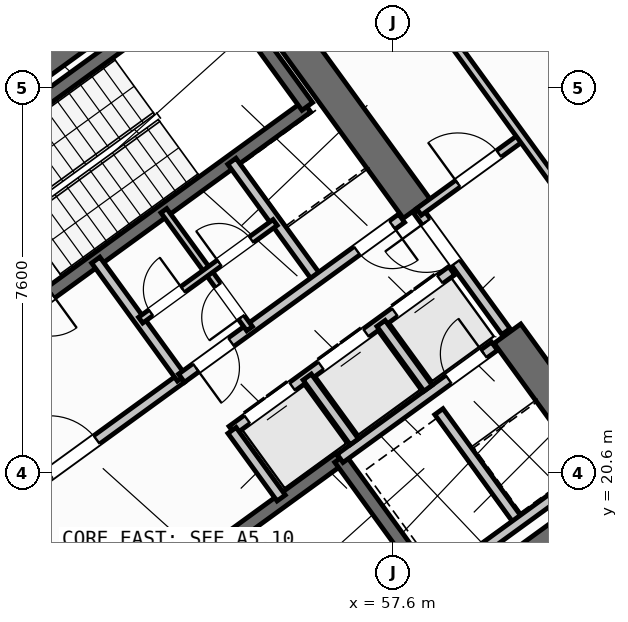
"""IFC4 building model, lengths in metres.
Left out: names, types, materials, properties, quantities, classifications, styles, units other than length and angle.
Written with IfcOpenShell. Run it as: python <this file> out.ifc"""

import sys

from ifc_helpers import new_model, si_unit, direction, frame, frame_2d, origin, place, context, subcontext, project, spatial, rectangle, extrude, source, transform, mapped, element, fill, save


model = new_model("IFC4")
c1 = context("Model", 3, precision=1e-05, world=origin(), true_north=direction((0.0, 1.0)))
c2 = subcontext(c1, "Body", "Model", "MODEL_VIEW")
j1 = project(units=[si_unit("LENGTHUNIT", "METRE"), si_unit("PLANEANGLEUNIT", "RADIAN")], contexts=[c1])
p1 = place(None, origin())
s1 = spatial("IfcSite", under=j1, at=p1, CompositionType="ELEMENT")
p2 = place(p1, origin())
s2 = spatial("IfcBuilding", under=s1, at=p2, CompositionType="ELEMENT")
p3 = place(p2, frame((0.0, 0.0, 67.2)))
s3 = spatial("IfcBuildingStorey", under=s2, at=p3, CompositionType="ELEMENT", Elevation=67.2)
p4 = place(p3, frame((52.318, 13.11, 0.0), z_axis=(0.0, 0.0, 1.0), x_axis=(0.809019445368, 0.587781878776, 0.0)))
e1 = element("IfcWall", 1, at=p4, inside=s3, PredefinedType="SHEAR", context=c2, shape_type="SweptSolid", body=[
    extrude(rectangle(XDim=12.44, YDim=0.65, at=frame_2d((6.22, 0.0))), origin(), (0.0, 0.0, 1.0), 4.22),
])
p5 = place(p3, frame((44.325, 24.113, 0.0), z_axis=(0.0, 0.0, 1.0), x_axis=(0.809012664862, 0.58779121131, 0.0)))
e2 = element("IfcWall", 2, at=p5, inside=s3, PredefinedType="SHEAR", context=c2, shape_type="SweptSolid", body=[
    extrude(rectangle(XDim=12.44, YDim=0.65, at=frame_2d((6.22, 0.0))), origin(), (0.0, 0.0, 1.0), 4.22),
])
p6 = place(p3, frame((61.929, 20.494, 0.0), z_axis=(0.0, 0.0, 1.0), x_axis=(-0.58782982593, 0.808984607855, 0.0)))
e3 = element("IfcWall", 3, at=p6, inside=s3, PredefinedType="SHEAR", context=c2, shape_type="SweptSolid", body=[
    extrude(rectangle(XDim=3.525, YDim=0.65, at=frame_2d((1.762, 0.0))), origin(), (0.0, 0.0, 1.0), 4.22),
])
p7 = place(p3, frame((58.064, 25.813, 0.0), z_axis=(0.0, 0.0, 1.0), x_axis=(-0.58777996584, 0.809020835181, 0.0)))
e4 = element("IfcWall", 4, at=p7, inside=s3, PredefinedType="SHEAR", context=c2, shape_type="SweptSolid", body=[
    extrude(rectangle(XDim=6.375, YDim=0.65, at=frame_2d((3.188, 0.0))), origin(), (0.0, 0.0, 1.0), 4.22),
])
p8 = place(p3, frame((43.938, 25.192, 0.0), z_axis=(0.0, 0.0, 1.0), x_axis=(0.809016324578, 0.587786174187, 0.0)))
e5 = element("IfcWall", 5, at=p8, inside=s3, PredefinedType="STANDARD", context=c2, shape_type="SweptSolid", body=[
    extrude(rectangle(XDim=17.587, YDim=0.32, at=frame_2d((8.794, 0.0))), origin(), (0.0, 0.0, 1.0), 4.22),
])
p9 = place(p8, frame((14.926, 0.0, 0.0)))
e6 = element("IfcOpeningElement", 6, at=p9, cuts=e5, PredefinedType="OPENING", context=c2, shape_type="SweptSolid", body=[
    extrude(rectangle(XDim=1.05, YDim=2.15, at=frame_2d((0.525, 1.075))), frame((0.0, 0.17, 0.0), z_axis=(0.0, -1.0, 0.0), x_axis=(1.0, 0.0, 0.0)), (0.0, 0.0, 1.0), 0.34),
])
p10 = place(p8, frame((2.606, 0.0, 0.8)))
e7 = element("IfcOpeningElement", 7, at=p10, cuts=e5, PredefinedType="OPENING", context=c2, shape_type="SweptSolid", body=[
    extrude(rectangle(XDim=2.1, YDim=1.55, at=frame_2d((1.05, 0.775))), frame((0.0, 0.17, 0.0), z_axis=(0.0, -1.0, 0.0), x_axis=(1.0, 0.0, 0.0)), (0.0, 0.0, 1.0), 0.34),
])
p11 = place(p8, frame((6.881, 0.0, 0.8)))
e8 = element("IfcOpeningElement", 8, at=p11, cuts=e5, PredefinedType="OPENING", context=c2, shape_type="SweptSolid", body=[
    extrude(rectangle(XDim=2.1, YDim=1.55, at=frame_2d((1.05, 0.775))), frame((0.0, 0.17, 0.0), z_axis=(0.0, -1.0, 0.0), x_axis=(1.0, 0.0, 0.0)), (0.0, 0.0, 1.0), 0.34),
])
p12 = place(p3, frame((58.455, 35.484, 0.0), z_axis=(0.0, 0.0, 1.0), x_axis=(0.587783625747, -0.809018176127, 0.0)))
e9 = element("IfcWall", 9, at=p12, inside=s3, PredefinedType="STANDARD", context=c2, shape_type="SweptSolid", body=[
    extrude(rectangle(XDim=21.587, YDim=0.32, at=frame_2d((10.794, 0.0))), origin(), (0.0, 0.0, 1.0), 2.395),
])
p13 = place(p12, frame((2.194, 0.0, 1.0)))
e10 = element("IfcOpeningElement", 10, at=p13, cuts=e9, PredefinedType="OPENING", context=c2, shape_type="SweptSolid", body=[
    extrude(rectangle(XDim=0.9, YDim=1.25, at=frame_2d((0.45, 0.625))), frame((0.0, 0.17, 0.0), z_axis=(0.0, -1.0, 0.0), x_axis=(1.0, 0.0, 0.0)), (0.0, 0.0, 1.0), 0.34),
])
p14 = place(p12, frame((4.994, 0.0, 1.0)))
e11 = element("IfcOpeningElement", 11, at=p14, cuts=e9, PredefinedType="OPENING", context=c2, shape_type="SweptSolid", body=[
    extrude(rectangle(XDim=0.9, YDim=1.25, at=frame_2d((0.45, 0.625))), frame((0.0, 0.17, 0.0), z_axis=(0.0, -1.0, 0.0), x_axis=(1.0, 0.0, 0.0)), (0.0, 0.0, 1.0), 0.34),
])
p15 = place(p12, frame((12.384, 0.0, 1.0)))
e12 = element("IfcOpeningElement", 12, at=p15, cuts=e9, PredefinedType="OPENING", context=c2, shape_type="SweptSolid", body=[
    extrude(rectangle(XDim=0.9, YDim=1.25, at=frame_2d((0.45, 0.625))), frame((0.0, 0.17, 0.0), z_axis=(0.0, -1.0, 0.0), x_axis=(1.0, 0.0, 0.0)), (0.0, 0.0, 1.0), 0.34),
])
p16 = place(p12, frame((18.835, 0.0, 1.0)))
e13 = element("IfcOpeningElement", 13, at=p16, cuts=e9, PredefinedType="OPENING", context=c2, shape_type="SweptSolid", body=[
    extrude(rectangle(XDim=0.9, YDim=1.25, at=frame_2d((0.45, 0.625))), frame((0.0, 0.17, 0.0), z_axis=(0.0, -1.0, 0.0), x_axis=(1.0, 0.0, 0.0)), (0.0, 0.0, 1.0), 0.34),
])
p17 = place(p3, frame((48.006, 25.996, 0.0), z_axis=(0.0, 0.0, 1.0), x_axis=(0.80901903764, 0.587782439969, 0.0)))
e14 = element("IfcWall", 14, at=p17, inside=s3, PredefinedType="SHEAR", context=c2, shape_type="SweptSolid", body=[
    extrude(rectangle(XDim=7.46, YDim=0.26, at=frame_2d((3.73, 0.0))), origin(), (0.0, 0.0, 1.0), 4.22),
])
p18 = place(p3, frame((49.863, 23.44, 0.0), z_axis=(0.0, 0.0, 1.0), x_axis=(0.809003474932, 0.587803859759, 0.0)))
e15 = element("IfcWall", 15, at=p18, inside=s3, PredefinedType="SHEAR", context=c2, shape_type="SweptSolid", body=[
    extrude(rectangle(XDim=7.46, YDim=0.26, at=frame_2d((3.73, 0.0))), origin(), (0.0, 0.0, 1.0), 4.22),
])
p19 = place(p18, frame((0.36, 0.0, 0.0)))
e16 = element("IfcOpeningElement", 16, at=p19, cuts=e15, PredefinedType="OPENING", context=c2, shape_type="SweptSolid", body=[
    extrude(rectangle(XDim=0.86, YDim=2.05, at=frame_2d((0.43, 1.025))), frame((0.0, 0.14, 0.0), z_axis=(0.0, -1.0, 0.0), x_axis=(1.0, 0.0, 0.0)), (0.0, 0.0, 1.0), 0.28),
])
p20 = place(p3, frame((55.906, 27.831, 0.0), z_axis=(0.0, 0.0, 1.0), x_axis=(-0.587804123638, 0.809003283204, 0.0)))
e17 = element("IfcWall", 17, at=p20, inside=s3, PredefinedType="SHEAR", context=c2, shape_type="SweptSolid", body=[
    extrude(rectangle(XDim=3.16, YDim=0.26, at=frame_2d((1.58, 0.0))), origin(), (0.0, 0.0, 1.0), 4.22),
])
p21 = place(p3, frame((50.615, 16.57, 0.0), z_axis=(0.0, 0.0, 1.0), x_axis=(0.809028366311, 0.587769599847, 0.0)))
e18 = element("IfcWall", 18, at=p21, inside=s3, PredefinedType="SHEAR", context=c2, shape_type="SweptSolid", body=[
    extrude(rectangle(XDim=7.33, YDim=0.26, at=frame_2d((3.665, 0.0))), origin(), (0.0, 0.0, 1.0), 4.22),
])
p22 = place(p21, frame((0.22, 0.0, 0.0)))
e19 = element("IfcOpeningElement", 19, at=p22, cuts=e18, PredefinedType="OPENING", context=c2, shape_type="SweptSolid", body=[
    extrude(rectangle(XDim=1.1, YDim=2.1, at=frame_2d((0.55, 1.05))), frame((0.0, 0.14, 0.0), z_axis=(0.0, -1.0, 0.0), x_axis=(1.0, 0.0, 0.0)), (0.0, 0.0, 1.0), 0.28),
])
p23 = place(p3, frame((58.41, 18.327, 0.0), z_axis=(0.0, 0.0, 1.0), x_axis=(-0.58776738483, 0.809029975545, 0.0)))
e20 = element("IfcWall", 20, at=p23, inside=s3, PredefinedType="SHEAR", context=c2, shape_type="SweptSolid", body=[
    extrude(rectangle(XDim=3.16, YDim=0.26, at=frame_2d((1.58, 0.0))), origin(), (0.0, 0.0, 1.0), 4.22),
])
p24 = place(p3, frame((48.799, 19.107, 0.0), z_axis=(0.0, 0.0, 1.0), x_axis=(0.809012959416, 0.587790805897, 0.0)))
e21 = element("IfcWall", 21, at=p24, inside=s3, PredefinedType="STANDARD", context=c2, shape_type="SweptSolid", body=[
    extrude(rectangle(XDim=5.718, YDim=0.2, at=frame_2d((2.859, 0.0))), origin(), (0.0, 0.0, 1.0), 4.21),
])
p25 = place(p24, frame((2.498, 0.0, 0.0)))
e22 = element("IfcOpeningElement", 22, at=p25, cuts=e21, PredefinedType="OPENING", context=c2, shape_type="SweptSolid", body=[
    extrude(rectangle(XDim=1.15, YDim=2.1, at=frame_2d((0.575, 1.05))), frame((0.0, 0.11, 0.0), z_axis=(0.0, -1.0, 0.0), x_axis=(1.0, 0.0, 0.0)), (0.0, 0.0, 1.0), 0.22),
])
p26 = place(p3, frame((56.553, 20.884, 0.0), z_axis=(0.0, 0.0, 1.0), x_axis=(0.809035789462, 0.587759382205, 0.0)))
e23 = element("IfcWall", 23, at=p26, inside=s3, PredefinedType="STANDARD", context=c2, shape_type="SweptSolid", body=[
    extrude(rectangle(XDim=3.768, YDim=0.2, at=frame_2d((1.884, 0.0))), origin(), (0.0, 0.0, 1.0), 4.21),
])
p27 = place(p26, frame((2.65, 0.0, 0.0)))
e24 = element("IfcOpeningElement", 24, at=p27, cuts=e23, PredefinedType="OPENING", context=c2, shape_type="SweptSolid", body=[
    extrude(rectangle(XDim=0.86, YDim=2.05, at=frame_2d((0.43, 1.025))), frame((0.0, 0.11, 0.0), z_axis=(0.0, -1.0, 0.0), x_axis=(1.0, 0.0, 0.0)), (0.0, 0.0, 1.0), 0.22),
])
p28 = place(p3, frame((54.421, 21.436, 0.0), z_axis=(0.0, 0.0, 1.0), x_axis=(0.809013710463, 0.587789772183, 0.0)))
e25 = element("IfcWall", 25, at=p28, inside=s3, PredefinedType="STANDARD", context=c2, shape_type="SweptSolid", body=[
    extrude(rectangle(XDim=5.36, YDim=0.2, at=frame_2d((2.68, 0.0))), origin(), (0.0, 0.0, 1.0), 4.21),
])
p29 = place(p28, frame((0.37, 0.0, 0.0)))
e26 = element("IfcOpeningElement", 26, at=p29, cuts=e25, PredefinedType="OPENING", context=c2, shape_type="SweptSolid", body=[
    extrude(rectangle(XDim=1.1, YDim=2.15, at=frame_2d((0.55, 1.075))), frame((0.0, 0.11, 0.0), z_axis=(0.0, -1.0, 0.0), x_axis=(1.0, 0.0, 0.0)), (0.0, 0.0, 1.0), 0.22),
])
p30 = place(p28, frame((2.17, 0.0, 0.0)))
e27 = element("IfcOpeningElement", 27, at=p30, cuts=e25, PredefinedType="OPENING", context=c2, shape_type="SweptSolid", body=[
    extrude(rectangle(XDim=1.1, YDim=2.15, at=frame_2d((0.55, 1.075))), frame((0.0, 0.11, 0.0), z_axis=(0.0, -1.0, 0.0), x_axis=(1.0, 0.0, 0.0)), (0.0, 0.0, 1.0), 0.22),
])
p31 = place(p28, frame((3.97, 0.0, 0.0)))
e28 = element("IfcOpeningElement", 28, at=p31, cuts=e25, PredefinedType="OPENING", context=c2, shape_type="SweptSolid", body=[
    extrude(rectangle(XDim=1.1, YDim=2.15, at=frame_2d((0.55, 1.075))), frame((0.0, 0.11, 0.0), z_axis=(0.0, -1.0, 0.0), x_axis=(1.0, 0.0, 0.0)), (0.0, 0.0, 1.0), 0.22),
])
p32 = place(p3, frame((55.391, 20.102, 0.0), z_axis=(0.0, 0.0, 1.0), x_axis=(-0.58778447739, 0.809017557374, 0.0)))
e29 = element("IfcWall", 29, at=p32, inside=s3, PredefinedType="STANDARD", context=c2, shape_type="SweptSolid", body=[
    extrude(rectangle(XDim=1.65, YDim=0.2, at=frame_2d((0.825, 0.0))), origin(), (0.0, 0.0, 1.0), 4.21),
])
p33 = place(p3, frame((56.834, 21.212, 0.0), z_axis=(0.0, 0.0, 1.0), x_axis=(-0.58776738483, 0.809029975545, 0.0)))
e30 = element("IfcWall", 30, at=p33, inside=s3, PredefinedType="STANDARD", context=c2, shape_type="SweptSolid", body=[
    extrude(rectangle(XDim=1.58, YDim=0.2, at=frame_2d((0.79, 0.0))), origin(), (0.0, 0.0, 1.0), 4.21),
])
p34 = place(p3, frame((58.29, 22.27, 0.0), z_axis=(0.0, 0.0, 1.0), x_axis=(-0.587840865826, 0.808976585857, 0.0)))
e31 = element("IfcWall", 31, at=p34, inside=s3, PredefinedType="STANDARD", context=c2, shape_type="SweptSolid", body=[
    extrude(rectangle(XDim=1.58, YDim=0.2, at=frame_2d((0.79, 0.0))), origin(), (0.0, 0.0, 1.0), 4.21),
])
p35 = place(p3, frame((60.067, 19.655, 0.0), z_axis=(0.0, 0.0, 1.0), x_axis=(-0.587800520745, 0.809005900975, 0.0)))
e32 = element("IfcWall", 32, at=p35, inside=s3, PredefinedType="STANDARD", context=c2, shape_type="SweptSolid", body=[
    extrude(rectangle(XDim=2.66, YDim=0.2, at=frame_2d((1.33, 0.0))), origin(), (0.0, 0.0, 1.0), 4.21),
])
p36 = place(p3, frame((58.472, 18.447, 0.0), z_axis=(0.0, 0.0, 1.0), x_axis=(0.809022487728, 0.587777691266, 0.0)))
e33 = element("IfcWall", 33, at=p36, inside=s3, PredefinedType="STANDARD", context=c2, shape_type="SweptSolid", body=[
    extrude(rectangle(XDim=3.648, YDim=0.2, at=frame_2d((1.824, 0.0))), origin(), (0.0, 0.0, 1.0), 4.21),
])
p37 = place(p3, frame((53.425, 22.468, 0.0), z_axis=(0.0, 0.0, 1.0), x_axis=(-0.5877230039, 0.809062216821, 0.0)))
e34 = element("IfcWall", 34, at=p37, inside=s3, PredefinedType="STANDARD", context=c2, shape_type="SweptSolid", body=[
    extrude(rectangle(XDim=2.88, YDim=0.2, at=frame_2d((1.44, 0.0))), origin(), (0.0, 0.0, 1.0), 4.21),
])
p38 = place(p3, frame((56.111, 24.419, 0.0), z_axis=(0.0, 0.0, 1.0), x_axis=(-0.58777848983, 0.809021907548, 0.0)))
e35 = element("IfcWall", 35, at=p38, inside=s3, PredefinedType="STANDARD", context=c2, shape_type="SweptSolid", body=[
    extrude(rectangle(XDim=2.88, YDim=0.2, at=frame_2d((1.44, 0.0))), origin(), (0.0, 0.0, 1.0), 4.21),
])
p39 = place(p3, frame((53.425, 22.468, 0.0), z_axis=(0.0, 0.0, 1.0), x_axis=(0.80902705128, 0.587771409902, 0.0)))
e36 = element("IfcWall", 36, at=p39, inside=s3, PredefinedType="STANDARD", context=c2, shape_type="SweptSolid", body=[
    extrude(rectangle(XDim=5.368, YDim=0.2, at=frame_2d((2.684, 0.0))), origin(), (0.0, 0.0, 1.0), 4.21),
])
p40 = place(p39, frame((4.28, 0.0, 0.0)))
e37 = element("IfcOpeningElement", 37, at=p40, cuts=e36, PredefinedType="OPENING", context=c2, shape_type="SweptSolid", body=[
    extrude(rectangle(XDim=0.86, YDim=2.05, at=frame_2d((0.43, 1.025))), frame((0.0, 0.11, 0.0), z_axis=(0.0, -1.0, 0.0), x_axis=(1.0, 0.0, 0.0)), (0.0, 0.0, 1.0), 0.22),
])
p41 = place(p39, frame((0.35, 0.0, 0.0)))
e38 = element("IfcOpeningElement", 38, at=p41, cuts=e36, PredefinedType="OPENING", context=c2, shape_type="SweptSolid", body=[
    extrude(rectangle(XDim=0.86, YDim=2.05, at=frame_2d((0.43, 1.025))), frame((0.0, 0.11, 0.0), z_axis=(0.0, -1.0, 0.0), x_axis=(1.0, 0.0, 0.0)), (0.0, 0.0, 1.0), 0.22),
])
p42 = place(p3, frame((54.768, 23.443, 0.0), z_axis=(0.0, 0.0, 1.0), x_axis=(-0.587736077749, 0.809052719489, 0.0)))
e39 = element("IfcWall", 39, at=p42, inside=s3, PredefinedType="PLUMBINGWALL", context=c2, shape_type="SweptSolid", body=[
    extrude(rectangle(XDim=1.4, YDim=0.14, at=frame_2d((0.7, 0.0))), origin(), (0.0, 0.0, 1.0), 4.21),
])
p43 = place(p42, frame((0.28, 0.0, 0.0)))
e40 = element("IfcOpeningElement", 40, at=p43, cuts=e39, PredefinedType="OPENING", context=c2, shape_type="SweptSolid", body=[
    extrude(rectangle(XDim=0.78, YDim=2.05, at=frame_2d((0.39, 1.025))), frame((0.0, 0.08, 0.0), z_axis=(0.0, -1.0, 0.0), x_axis=(1.0, 0.0, 0.0)), (0.0, 0.0, 1.0), 0.16),
])
p44 = place(p3, frame((53.945, 24.576, 0.0), z_axis=(0.0, 0.0, 1.0), x_axis=(-0.587897037186, 0.808935766095, 0.0)))
e41 = element("IfcWall", 41, at=p44, inside=s3, PredefinedType="PLUMBINGWALL", context=c2, shape_type="SweptSolid", body=[
    extrude(rectangle(XDim=1.48, YDim=0.14, at=frame_2d((0.74, 0.0))), origin(), (0.0, 0.0, 1.0), 4.21),
])
p45 = place(p3, frame((52.618, 23.612, 0.0), z_axis=(0.0, 0.0, 1.0), x_axis=(0.809009587469, 0.587795446889, 0.0)))
e42 = element("IfcWall", 42, at=p45, inside=s3, PredefinedType="PLUMBINGWALL", context=c2, shape_type="SweptSolid", body=[
    extrude(rectangle(XDim=3.28, YDim=0.14, at=frame_2d((1.64, 0.0))), origin(), (0.0, 0.0, 1.0), 4.21),
])
p46 = place(p45, frame((0.25, 0.0, 0.0)))
e43 = element("IfcOpeningElement", 43, at=p46, cuts=e42, PredefinedType="OPENING", context=c2, shape_type="SweptSolid", body=[
    extrude(rectangle(XDim=0.78, YDim=2.05, at=frame_2d((0.39, 1.025))), frame((0.0, 0.08, 0.0), z_axis=(0.0, -1.0, 0.0), x_axis=(1.0, 0.0, 0.0)), (0.0, 0.0, 1.0), 0.16),
])
p47 = place(p45, frame((1.92, 0.0, 0.0)))
e44 = element("IfcOpeningElement", 44, at=p47, cuts=e42, PredefinedType="OPENING", context=c2, shape_type="SweptSolid", body=[
    extrude(rectangle(XDim=0.78, YDim=2.05, at=frame_2d((0.39, 1.025))), frame((0.0, 0.08, 0.0), z_axis=(0.0, -1.0, 0.0), x_axis=(1.0, 0.0, 0.0)), (0.0, 0.0, 1.0), 0.16),
])
p48 = place(p3, frame((59.827, 23.386, 0.0), z_axis=(0.0, 0.0, 1.0), x_axis=(-0.587803840107, 0.809003489211, 0.0)))
e45 = element("IfcWall", 45, at=p48, inside=s3, PredefinedType="STANDARD", context=c2, shape_type="SweptSolid", body=[
    extrude(rectangle(XDim=2.96, YDim=0.2, at=frame_2d((1.48, 0.0))), origin(), (0.0, 0.0, 1.0), 2.395),
])
p49 = place(p48, frame((1.68, 0.0, 0.0)))
e46 = element("IfcOpeningElement", 46, at=p49, cuts=e45, PredefinedType="OPENING", context=c2, shape_type="SweptSolid", body=[
    extrude(rectangle(XDim=1.0, YDim=2.1, at=frame_2d((0.5, 1.05))), frame((0.0, 0.11, 0.0), z_axis=(0.0, -1.0, 0.0), x_axis=(1.0, 0.0, 0.0)), (0.0, 0.0, 1.0), 0.22),
])
p50 = place(p3, frame((58.111, 25.749, 0.0), z_axis=(0.0, 0.0, 1.0), x_axis=(0.809000999347, 0.58780726693, 0.0)))
e47 = element("IfcWall", 47, at=p50, inside=s3, PredefinedType="PARTITIONING", context=c2, shape_type="SweptSolid", body=[
    extrude(rectangle(XDim=2.51, YDim=0.16, at=frame_2d((1.255, 0.0))), origin(), (0.0, 0.0, 1.0), 3.595),
])
p51 = place(p50, frame((0.95, 0.0, 0.0)))
e48 = element("IfcOpeningElement", 48, at=p51, cuts=e47, PredefinedType="OPENING", context=c2, shape_type="SweptSolid", body=[
    extrude(rectangle(XDim=1.0, YDim=2.1, at=frame_2d((0.5, 1.05))), frame((0.0, 0.09, 0.0), z_axis=(0.0, -1.0, 0.0), x_axis=(1.0, 0.0, 0.0)), (0.0, 0.0, 1.0), 0.18),
])
p52 = place(p3, frame((60.829, 26.278, 0.0), z_axis=(0.0, 0.0, 1.0), x_axis=(-0.587781800813, 0.80901950201, 0.0)))
e49 = element("IfcWall", 49, at=p52, inside=s3, PredefinedType="PARTITIONING", context=c2, shape_type="SweptSolid", body=[
    extrude(rectangle(XDim=8.9, YDim=0.16, at=frame_2d((4.45, 0.0))), origin(), (0.0, 0.0, 1.0), 4.21),
])
p53 = place(p3, frame((53.705, 11.126, 0.0), z_axis=(0.0, 0.0, 1.0), x_axis=(0.809014504436, 0.587788679384, 0.0)))
e50 = element("IfcWall", 50, at=p53, inside=s3, PredefinedType="PARTITIONING", context=c2, shape_type="SweptSolid", body=[
    extrude(rectangle(XDim=14.67, YDim=0.16, at=frame_2d((7.335, 0.0))), origin(), (0.0, 0.0, 1.0), 4.21),
])
p54 = place(p53, frame((10.2, 0.0, 0.0)))
e51 = element("IfcOpeningElement", 51, at=p54, cuts=e50, PredefinedType="OPENING", context=c2, shape_type="SweptSolid", body=[
    extrude(rectangle(XDim=1.0, YDim=2.1, at=frame_2d((0.5, 1.05))), frame((0.0, 0.09, 0.0), z_axis=(0.0, -1.0, 0.0), x_axis=(1.0, 0.0, 0.0)), (0.0, 0.0, 1.0), 0.18),
])
m1 = source(origin(), c2, "Body", "SweptSolid", [
    extrude(rectangle(XDim=1.15, YDim=2.1, at=frame_2d((0.575, 1.05))), frame((0.0, 0.025, 0.0), z_axis=(0.0, -1.0, 0.0), x_axis=(1.0, 0.0, 0.0)), (0.0, 0.0, 1.0), 0.05),
])
p55 = place(p25, origin())
e52 = element("IfcDoor", 52, at=p55, inside=s3, OperationType="SINGLE_SWING_LEFT", PredefinedType="DOOR", context=c2, shape_type="MappedRepresentation", body=[
    mapped(m1, transform((0.0, 0.0, 0.0), scale=1.0)),
])
fill(e22, e52)
m2 = source(origin(), c2, "Body", "SweptSolid", [
    extrude(rectangle(XDim=1.1, YDim=2.15, at=frame_2d((0.55, 1.075))), frame((0.0, 0.025, 0.0), z_axis=(0.0, -1.0, 0.0), x_axis=(1.0, 0.0, 0.0)), (0.0, 0.0, 1.0), 0.05),
])
p56 = place(p29, origin())
e53 = element("IfcDoor", 53, at=p56, inside=s3, OperationType="DOUBLE_DOOR_SLIDING", PredefinedType="DOOR", context=c2, shape_type="MappedRepresentation", body=[
    mapped(m2, transform((0.0, 0.0, 0.0), scale=1.0)),
])
fill(e26, e53)
p57 = place(p30, origin())
e54 = element("IfcDoor", 54, at=p57, inside=s3, OperationType="DOUBLE_DOOR_SLIDING", PredefinedType="DOOR", context=c2, shape_type="MappedRepresentation", body=[
    mapped(m2, transform((0.0, 0.0, 0.0), scale=1.0)),
])
fill(e27, e54)
p58 = place(p31, origin())
e55 = element("IfcDoor", 55, at=p58, inside=s3, OperationType="DOUBLE_DOOR_SLIDING", PredefinedType="DOOR", context=c2, shape_type="MappedRepresentation", body=[
    mapped(m2, transform((0.0, 0.0, 0.0), scale=1.0)),
])
fill(e28, e55)
m3 = source(origin(), c2, "Body", "SweptSolid", [
    extrude(rectangle(XDim=0.86, YDim=2.05, at=frame_2d((0.43, 1.025))), frame((0.0, 0.025, 0.0), z_axis=(0.0, -1.0, 0.0), x_axis=(1.0, 0.0, 0.0)), (0.0, 0.0, 1.0), 0.05),
])
p59 = place(p27, origin())
e56 = element("IfcDoor", 56, at=p59, inside=s3, OperationType="SINGLE_SWING_RIGHT", PredefinedType="DOOR", context=c2, shape_type="MappedRepresentation", body=[
    mapped(m3, transform((0.0, 0.0, 0.0), scale=1.0)),
])
fill(e24, e56)
p60 = place(p40, frame((0.86, 0.0, 0.0), z_axis=(0.0, 0.0, 1.0), x_axis=(-1.0, 0.0, 0.0)))
e57 = element("IfcDoor", 57, at=p60, inside=s3, OperationType="SINGLE_SWING_LEFT", PredefinedType="DOOR", context=c2, shape_type="MappedRepresentation", body=[
    mapped(m3, transform((0.0, 0.0, 0.0), scale=1.0)),
])
fill(e37, e57)
p61 = place(p41, frame((0.86, 0.0, 0.0), z_axis=(0.0, 0.0, 1.0), x_axis=(-1.0, 0.0, 0.0)))
e58 = element("IfcDoor", 58, at=p61, inside=s3, OperationType="SINGLE_SWING_RIGHT", PredefinedType="DOOR", context=c2, shape_type="MappedRepresentation", body=[
    mapped(m3, transform((0.0, 0.0, 0.0), scale=1.0)),
])
fill(e38, e58)
m4 = source(origin(), c2, "Body", "SweptSolid", [
    extrude(rectangle(XDim=0.78, YDim=2.05, at=frame_2d((0.39, 1.025))), frame((0.0, 0.025, 0.0), z_axis=(0.0, -1.0, 0.0), x_axis=(1.0, 0.0, 0.0)), (0.0, 0.0, 1.0), 0.05),
])
p62 = place(p43, origin())
e59 = element("IfcDoor", 59, at=p62, inside=s3, OperationType="SINGLE_SWING_LEFT", PredefinedType="DOOR", context=c2, shape_type="MappedRepresentation", body=[
    mapped(m4, transform((0.0, 0.0, 0.0), scale=1.0)),
])
fill(e40, e59)
p63 = place(p46, origin())
e60 = element("IfcDoor", 60, at=p63, inside=s3, OperationType="SINGLE_SWING_RIGHT", PredefinedType="DOOR", context=c2, shape_type="MappedRepresentation", body=[
    mapped(m4, transform((0.0, 0.0, 0.0), scale=1.0)),
])
fill(e43, e60)
p64 = place(p47, origin())
e61 = element("IfcDoor", 61, at=p64, inside=s3, OperationType="SINGLE_SWING_LEFT", PredefinedType="DOOR", context=c2, shape_type="MappedRepresentation", body=[
    mapped(m4, transform((0.0, 0.0, 0.0), scale=1.0)),
])
fill(e44, e61)
m5 = source(origin(), c2, "Body", "SweptSolid", [
    extrude(rectangle(XDim=1.0, YDim=2.1, at=frame_2d((0.5, 1.05))), frame((0.0, 0.025, 0.0), z_axis=(0.0, -1.0, 0.0), x_axis=(1.0, 0.0, 0.0)), (0.0, 0.0, 1.0), 0.05),
])
p65 = place(p51, origin())
e62 = element("IfcDoor", 62, at=p65, inside=s3, OperationType="SINGLE_SWING_LEFT", PredefinedType="DOOR", context=c2, shape_type="MappedRepresentation", body=[
    mapped(m5, transform((0.0, 0.0, 0.0), scale=1.0)),
])
fill(e48, e62)
p66 = place(p49, origin())
e63 = element("IfcDoor", 63, at=p66, inside=s3, OperationType="SINGLE_SWING_RIGHT", PredefinedType="DOOR", context=c2, shape_type="MappedRepresentation", body=[
    mapped(m5, transform((0.0, 0.0, 0.0), scale=1.0)),
])
fill(e46, e63)
save(model, sys.argv[1])
